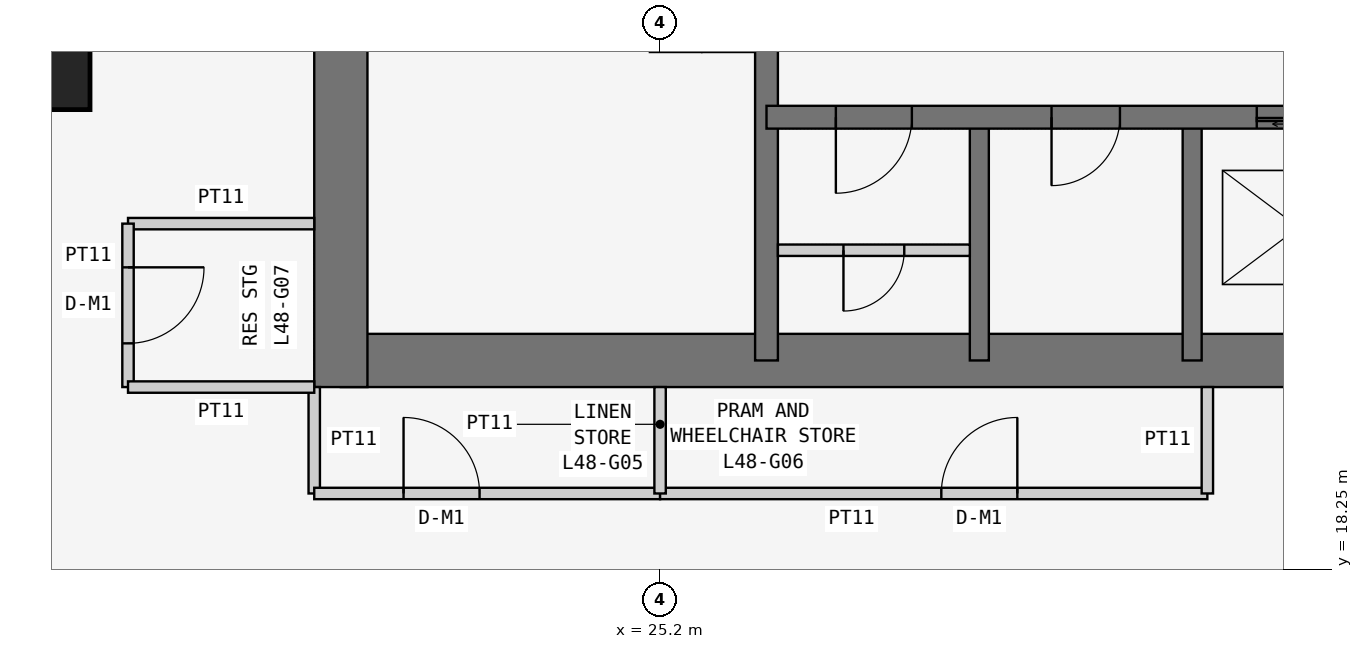
"""IFC4 building model, lengths in metres.
Left out: names, types, materials, properties, quantities, classifications, styles, units other than length and angle.
Written with IfcOpenShell. Run it as: python <this file> out.ifc"""

import sys

from ifc_helpers import new_model, si_unit, direction, frame, frame_2d, origin, origin_2d, place, context, subcontext, project, spatial, rectangle, extrude, element, fill, save


model = new_model("IFC4")
c1 = context("Model", 3, precision=1e-05, world=origin(), true_north=direction((0.0, 1.0)))
c2 = subcontext(c1, "Body", "Model", "MODEL_VIEW")
j1 = project(units=[si_unit("LENGTHUNIT", "METRE"), si_unit("PLANEANGLEUNIT", "RADIAN")], contexts=[c1])
p1 = place(None, origin())
s1 = spatial("IfcSite", under=j1, at=p1, CompositionType="ELEMENT")
p2 = place(p1, origin())
s2 = spatial("IfcBuilding", under=s1, at=p2, CompositionType="ELEMENT")
p3 = place(p2, frame((0.0, 0.0, 186.9)))
s3 = spatial("IfcBuildingStorey", under=s2, at=p3, CompositionType="ELEMENT", Elevation=186.9)
p4 = place(p3, frame((16.8, 25.2, 0.0), z_axis=(0.0, 0.0, 1.0), x_axis=(1.0, 0.0, 0.0)))
e1 = element("IfcColumn", 1, at=p4, inside=s3, PredefinedType="COLUMN", context=c2, shape_type="SweptSolid", body=[
    extrude(rectangle(XDim=1.8, YDim=1.8, at=origin_2d()), origin(), (0.0, 0.0, 1.0), 3.6),
])
p5 = place(p3, frame((21.0, 21.0, 0.0), z_axis=(0.0, 0.0, 1.0), x_axis=(1.0, 0.0, 0.0)))
e2 = element("IfcWall", 2, at=p5, inside=s3, PredefinedType="SHEAR", context=c2, shape_type="SweptSolid", body=[
    extrude(rectangle(XDim=17.15, YDim=0.7, at=frame_2d((8.575, 0.0))), origin(), (0.0, 0.0, 1.0), 3.6),
])
p6 = place(p3, frame((21.0, 37.8, 0.0), z_axis=(0.0, 0.0, 1.0), x_axis=(0.0, -1.0, 0.0)))
e3 = element("IfcWall", 3, at=p6, inside=s3, PredefinedType="SHEAR", context=c2, shape_type="SweptSolid", body=[
    extrude(rectangle(XDim=17.15, YDim=0.7, at=frame_2d((8.575, 0.0))), origin(), (0.0, 0.0, 1.0), 3.6),
])
p7 = place(p6, frame((5.4, 0.0, 0.0)))
e4 = element("IfcOpeningElement", 4, at=p7, cuts=e3, PredefinedType="OPENING", context=c2, shape_type="SweptSolid", body=[
    extrude(rectangle(XDim=1.2, YDim=2.1, at=frame_2d((0.6, 1.05))), frame((0.0, 0.36, 0.0), z_axis=(0.0, -1.0, 0.0), x_axis=(1.0, 0.0, 0.0)), (0.0, 0.0, 1.0), 0.72),
])
p8 = place(p3, frame((26.6, 21.0, 0.0), z_axis=(0.0, 0.0, 1.0), x_axis=(0.0, 1.0, 0.0)))
e5 = element("IfcWall", 5, at=p8, inside=s3, PredefinedType="SHEAR", context=c2, shape_type="SweptSolid", body=[
    extrude(rectangle(XDim=16.8, YDim=0.3, at=frame_2d((8.4, 0.0))), origin(), (0.0, 0.0, 1.0), 3.6),
])
p9 = place(p8, frame((10.4, 0.0, 0.0)))
e6 = element("IfcOpeningElement", 6, at=p9, cuts=e5, PredefinedType="OPENING", context=c2, shape_type="SweptSolid", body=[
    extrude(rectangle(XDim=1.2, YDim=2.1, at=frame_2d((0.6, 1.05))), frame((0.0, 0.16, 0.0), z_axis=(0.0, -1.0, 0.0), x_axis=(1.0, 0.0, 0.0)), (0.0, 0.0, 1.0), 0.32),
])
p10 = place(p3, frame((26.6, 24.2, 0.0), z_axis=(0.0, 0.0, 1.0), x_axis=(1.0, 0.0, 0.0)))
e7 = element("IfcWall", 7, at=p10, inside=s3, PredefinedType="SHEAR", context=c2, shape_type="SweptSolid", body=[
    extrude(rectangle(XDim=11.2, YDim=0.3, at=frame_2d((5.6, 0.0))), origin(), (0.0, 0.0, 1.0), 3.6),
])
p11 = place(p10, frame((0.913, 0.0, 0.0)))
e8 = element("IfcOpeningElement", 8, at=p11, cuts=e7, PredefinedType="OPENING", context=c2, shape_type="SweptSolid", body=[
    extrude(rectangle(XDim=1.0, YDim=2.1, at=frame_2d((0.5, 1.05))), frame((0.0, 0.16, 0.0), z_axis=(0.0, -1.0, 0.0), x_axis=(1.0, 0.0, 0.0)), (0.0, 0.0, 1.0), 0.32),
])
p12 = place(p10, frame((3.75, 0.0, 0.0)))
e9 = element("IfcOpeningElement", 9, at=p12, cuts=e7, PredefinedType="OPENING", context=c2, shape_type="SweptSolid", body=[
    extrude(rectangle(XDim=0.9, YDim=2.1, at=frame_2d((0.45, 1.05))), frame((0.0, 0.16, 0.0), z_axis=(0.0, -1.0, 0.0), x_axis=(1.0, 0.0, 0.0)), (0.0, 0.0, 1.0), 0.32),
])
p13 = place(p10, frame((6.45, 0.0, 0.0)))
e10 = element("IfcOpeningElement", 10, at=p13, cuts=e7, PredefinedType="OPENING", context=c2, shape_type="SweptSolid", body=[
    extrude(rectangle(XDim=1.1, YDim=2.1, at=frame_2d((0.55, 1.05))), frame((0.0, 0.16, 0.0), z_axis=(0.0, -1.0, 0.0), x_axis=(1.0, 0.0, 0.0)), (0.0, 0.0, 1.0), 0.32),
])
p14 = place(p10, frame((9.1, 0.0, 0.0)))
e11 = element("IfcOpeningElement", 11, at=p14, cuts=e7, PredefinedType="OPENING", context=c2, shape_type="SweptSolid", body=[
    extrude(rectangle(XDim=1.1, YDim=2.1, at=frame_2d((0.55, 1.05))), frame((0.0, 0.16, 0.0), z_axis=(0.0, -1.0, 0.0), x_axis=(1.0, 0.0, 0.0)), (0.0, 0.0, 1.0), 0.32),
])
for number, where, z_axis, x_axis in (
    (12, (29.4, 21.0, 0.0), (0.0, 0.0, 1.0), (0.0, 1.0, 0.0)),
    (13, (32.2, 21.0, 0.0), (0.0, 0.0, 1.0), (0.0, 1.0, 0.0)),
):
    element("IfcWall", number, at=place(p3, frame(where, z_axis=z_axis, x_axis=x_axis)), inside=s3, PredefinedType="SHEAR", context=c2, shape_type="SweptSolid", body=[
        extrude(rectangle(XDim=3.2, YDim=0.25, at=frame_2d((1.6, 0.0))), origin(), (0.0, 0.0, 1.0), 3.6),
    ])
p15 = place(p3, frame((20.65, 20.65, 0.0), z_axis=(0.0, 0.0, 1.0), x_axis=(0.0, -1.0, 0.0)))
e14 = element("IfcWall", 14, at=p15, inside=s3, PredefinedType="PARTITIONING", context=c2, shape_type="SweptSolid", body=[
    extrude(rectangle(XDim=1.4, YDim=0.15, at=frame_2d((0.7, 0.0))), origin(), (0.0, 0.0, 1.0), 3.45),
])
p16 = place(p3, frame((20.65, 19.25, 0.0), z_axis=(0.0, 0.0, 1.0), x_axis=(1.0, 0.0, 0.0)))
e15 = element("IfcWall", 15, at=p16, inside=s3, PredefinedType="PARTITIONING", context=c2, shape_type="SweptSolid", body=[
    extrude(rectangle(XDim=4.55, YDim=0.15, at=frame_2d((2.275, 0.0))), origin(), (0.0, 0.0, 1.0), 3.45),
])
p17 = place(p16, frame((1.175, 0.0, 0.0)))
e16 = element("IfcOpeningElement", 16, at=p17, cuts=e15, PredefinedType="OPENING", context=c2, shape_type="SweptSolid", body=[
    extrude(rectangle(XDim=1.0, YDim=2.1, at=frame_2d((0.5, 1.05))), frame((0.0, 0.085, 0.0), z_axis=(0.0, -1.0, 0.0), x_axis=(1.0, 0.0, 0.0)), (0.0, 0.0, 1.0), 0.17),
])
p18 = place(p3, frame((25.2, 19.25, 0.0), z_axis=(0.0, 0.0, 1.0), x_axis=(1.0, 0.0, 0.0)))
e17 = element("IfcWall", 17, at=p18, inside=s3, PredefinedType="PARTITIONING", context=c2, shape_type="SweptSolid", body=[
    extrude(rectangle(XDim=7.2, YDim=0.15, at=frame_2d((3.6, 0.0))), origin(), (0.0, 0.0, 1.0), 3.45),
])
p19 = place(p18, frame((3.7, 0.0, 0.0)))
e18 = element("IfcOpeningElement", 18, at=p19, cuts=e17, PredefinedType="OPENING", context=c2, shape_type="SweptSolid", body=[
    extrude(rectangle(XDim=1.0, YDim=2.1, at=frame_2d((0.5, 1.05))), frame((0.0, 0.085, 0.0), z_axis=(0.0, -1.0, 0.0), x_axis=(1.0, 0.0, 0.0)), (0.0, 0.0, 1.0), 0.17),
])
p20 = place(p3, frame((32.4, 19.25, 0.0), z_axis=(0.0, 0.0, 1.0), x_axis=(0.0, 1.0, 0.0)))
e19 = element("IfcWall", 19, at=p20, inside=s3, PredefinedType="PARTITIONING", context=c2, shape_type="SweptSolid", body=[
    extrude(rectangle(XDim=1.4, YDim=0.15, at=frame_2d((0.7, 0.0))), origin(), (0.0, 0.0, 1.0), 3.45),
])
p21 = place(p3, frame((20.65, 22.8, 0.0), z_axis=(0.0, 0.0, 1.0), x_axis=(-1.0, 0.0, 0.0)))
e20 = element("IfcWall", 20, at=p21, inside=s3, PredefinedType="PARTITIONING", context=c2, shape_type="SweptSolid", body=[
    extrude(rectangle(XDim=2.45, YDim=0.15, at=frame_2d((1.225, 0.0))), origin(), (0.0, 0.0, 1.0), 3.45),
])
p22 = place(p3, frame((18.2, 22.8, 0.0), z_axis=(0.0, 0.0, 1.0), x_axis=(0.0, -1.0, 0.0)))
e21 = element("IfcWall", 21, at=p22, inside=s3, PredefinedType="PARTITIONING", context=c2, shape_type="SweptSolid", body=[
    extrude(rectangle(XDim=2.15, YDim=0.15, at=frame_2d((1.075, 0.0))), origin(), (0.0, 0.0, 1.0), 3.45),
])
p23 = place(p22, frame((0.575, 0.0, 0.0)))
e22 = element("IfcOpeningElement", 22, at=p23, cuts=e21, PredefinedType="OPENING", context=c2, shape_type="SweptSolid", body=[
    extrude(rectangle(XDim=1.0, YDim=2.1, at=frame_2d((0.5, 1.05))), frame((0.0, 0.085, 0.0), z_axis=(0.0, -1.0, 0.0), x_axis=(1.0, 0.0, 0.0)), (0.0, 0.0, 1.0), 0.17),
])
p24 = place(p3, frame((18.2, 20.65, 0.0), z_axis=(0.0, 0.0, 1.0), x_axis=(1.0, 0.0, 0.0)))
e23 = element("IfcWall", 23, at=p24, inside=s3, PredefinedType="PARTITIONING", context=c2, shape_type="SweptSolid", body=[
    extrude(rectangle(XDim=2.45, YDim=0.15, at=frame_2d((1.225, 0.0))), origin(), (0.0, 0.0, 1.0), 3.45),
])
p25 = place(p3, frame((25.2, 19.25, 0.0), z_axis=(0.0, 0.0, 1.0), x_axis=(0.0, 1.0, 0.0)))
e24 = element("IfcWall", 24, at=p25, inside=s3, PredefinedType="PARTITIONING", context=c2, shape_type="SweptSolid", body=[
    extrude(rectangle(XDim=1.4, YDim=0.15, at=frame_2d((0.7, 0.0))), origin(), (0.0, 0.0, 1.0), 2.767),
])
p26 = place(p3, frame((26.75, 22.45, 0.0), z_axis=(0.0, 0.0, 1.0), x_axis=(1.0, 0.0, 0.0)))
e25 = element("IfcWall", 25, at=p26, inside=s3, PredefinedType="PARTITIONING", context=c2, shape_type="SweptSolid", body=[
    extrude(rectangle(XDim=2.525, YDim=0.15, at=frame_2d((1.262, 0.0))), origin(), (0.0, 0.0, 1.0), 3.45),
])
p27 = place(p26, frame((0.863, 0.0, 0.0)))
e26 = element("IfcOpeningElement", 26, at=p27, cuts=e25, PredefinedType="OPENING", context=c2, shape_type="SweptSolid", body=[
    extrude(rectangle(XDim=0.8, YDim=2.1, at=frame_2d((0.4, 1.05))), frame((0.0, 0.085, 0.0), z_axis=(0.0, -1.0, 0.0), x_axis=(1.0, 0.0, 0.0)), (0.0, 0.0, 1.0), 0.17),
])
p28 = place(p17, origin())
e27 = element("IfcDoor", 27, at=p28, inside=s3, OperationType="SINGLE_SWING_LEFT", PredefinedType="DOOR", context=c2, shape_type="SweptSolid", body=[
    extrude(rectangle(XDim=1.0, YDim=2.1, at=frame_2d((0.5, 1.05))), frame((0.0, 0.025, 0.0), z_axis=(0.0, -1.0, 0.0), x_axis=(1.0, 0.0, 0.0)), (0.0, 0.0, 1.0), 0.05),
])
fill(e16, e27)
p29 = place(p19, origin())
e28 = element("IfcDoor", 28, at=p29, inside=s3, OperationType="SINGLE_SWING_RIGHT", PredefinedType="DOOR", context=c2, shape_type="SweptSolid", body=[
    extrude(rectangle(XDim=1.0, YDim=2.1, at=frame_2d((0.5, 1.05))), frame((0.0, 0.025, 0.0), z_axis=(0.0, -1.0, 0.0), x_axis=(1.0, 0.0, 0.0)), (0.0, 0.0, 1.0), 0.05),
])
fill(e18, e28)
p30 = place(p23, origin())
e29 = element("IfcDoor", 29, at=p30, inside=s3, OperationType="SINGLE_SWING_LEFT", PredefinedType="DOOR", context=c2, shape_type="SweptSolid", body=[
    extrude(rectangle(XDim=1.0, YDim=2.1, at=frame_2d((0.5, 1.05))), frame((0.0, 0.025, 0.0), z_axis=(0.0, -1.0, 0.0), x_axis=(1.0, 0.0, 0.0)), (0.0, 0.0, 1.0), 0.05),
])
fill(e22, e29)
p31 = place(p11, frame((1.0, 0.0, 0.0), z_axis=(0.0, 0.0, 1.0), x_axis=(-1.0, 0.0, 0.0)))
e30 = element("IfcDoor", 30, at=p31, inside=s3, OperationType="SINGLE_SWING_RIGHT", PredefinedType="DOOR", context=c2, shape_type="SweptSolid", body=[
    extrude(rectangle(XDim=1.0, YDim=2.1, at=frame_2d((0.5, 1.05))), frame((0.0, 0.025, 0.0), z_axis=(0.0, -1.0, 0.0), x_axis=(1.0, 0.0, 0.0)), (0.0, 0.0, 1.0), 0.05),
])
fill(e8, e30)
p32 = place(p27, frame((0.8, 0.0, 0.0), z_axis=(0.0, 0.0, 1.0), x_axis=(-1.0, 0.0, 0.0)))
e31 = element("IfcDoor", 31, at=p32, inside=s3, OperationType="SINGLE_SWING_RIGHT", PredefinedType="DOOR", context=c2, shape_type="SweptSolid", body=[
    extrude(rectangle(XDim=0.8, YDim=2.1, at=frame_2d((0.4, 1.05))), frame((0.0, 0.025, 0.0), z_axis=(0.0, -1.0, 0.0), x_axis=(1.0, 0.0, 0.0)), (0.0, 0.0, 1.0), 0.05),
])
fill(e26, e31)
p33 = place(p12, frame((0.9, 0.0, 0.0), z_axis=(0.0, 0.0, 1.0), x_axis=(-1.0, 0.0, 0.0)))
e32 = element("IfcDoor", 32, at=p33, inside=s3, OperationType="SINGLE_SWING_RIGHT", PredefinedType="DOOR", context=c2, shape_type="SweptSolid", body=[
    extrude(rectangle(XDim=0.9, YDim=2.1, at=frame_2d((0.45, 1.05))), frame((0.0, 0.025, 0.0), z_axis=(0.0, -1.0, 0.0), x_axis=(1.0, 0.0, 0.0)), (0.0, 0.0, 1.0), 0.05),
])
fill(e9, e32)
p34 = place(p13, origin())
e33 = element("IfcDoor", 33, at=p34, inside=s3, OperationType="DOUBLE_DOOR_SLIDING", PredefinedType="DOOR", context=c2, shape_type="SweptSolid", body=[
    extrude(rectangle(XDim=1.1, YDim=2.1, at=frame_2d((0.55, 1.05))), frame((0.0, 0.025, 0.0), z_axis=(0.0, -1.0, 0.0), x_axis=(1.0, 0.0, 0.0)), (0.0, 0.0, 1.0), 0.05),
])
fill(e10, e33)
save(model, sys.argv[1])
